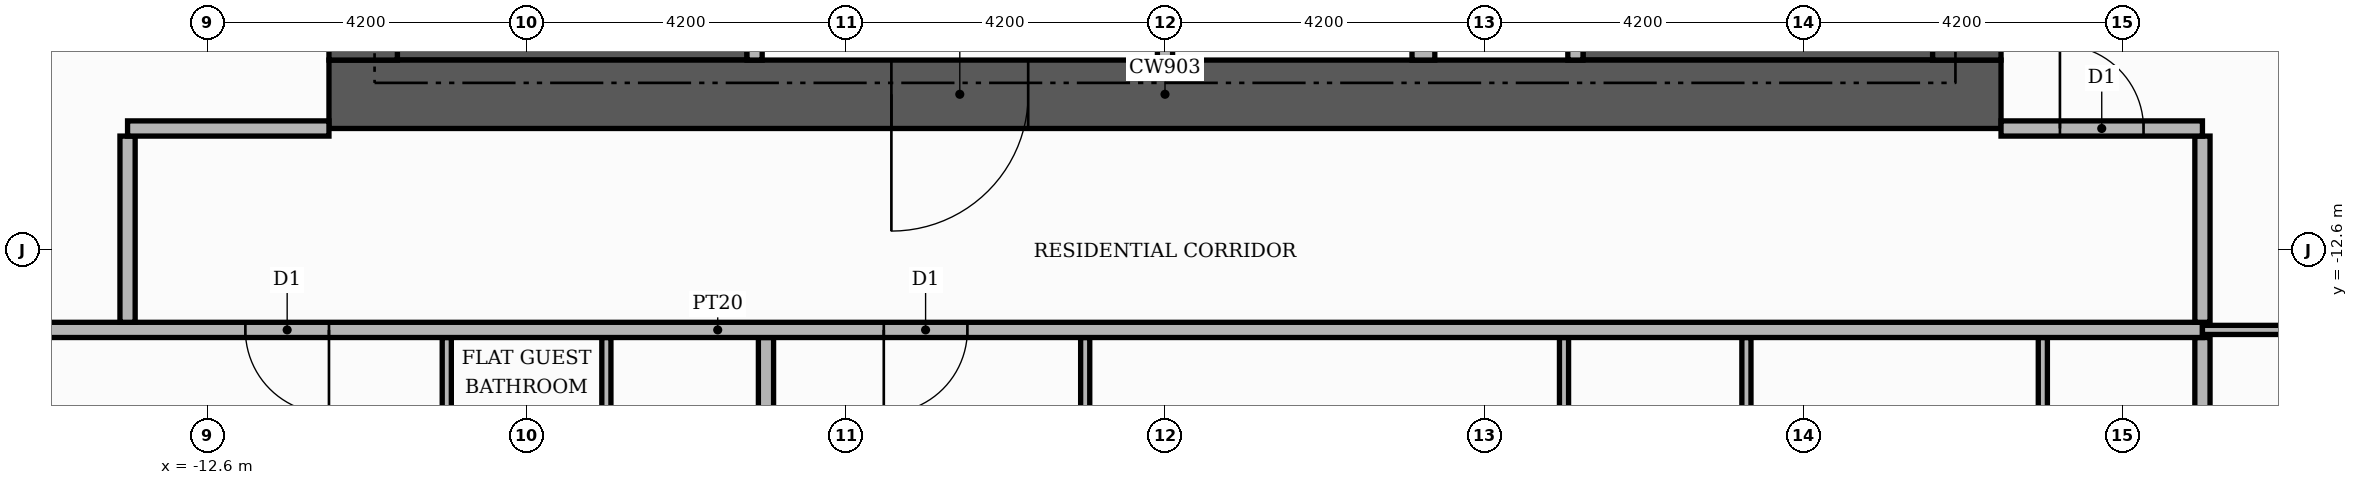
"""IFC4 building model, lengths in metres.
Left out: names, types, materials, properties, quantities, classifications, styles, units other than length and angle.
Written with IfcOpenShell. Run it as: python <this file> out.ifc"""

import sys

from ifc_helpers import new_model, si_unit, direction, frame, frame_2d, origin, place, context, subcontext, project, spatial, rectangle, extrude, element, fill, save


model = new_model("IFC4")
c1 = context("Model", 3, precision=1e-05, world=origin(), true_north=direction((0.0, 1.0)))
c2 = subcontext(c1, "Body", "Model", "MODEL_VIEW")
j1 = project(units=[si_unit("LENGTHUNIT", "METRE"), si_unit("PLANEANGLEUNIT", "RADIAN")], contexts=[c1])
p1 = place(None, origin())
s1 = spatial("IfcSite", under=j1, at=p1, CompositionType="ELEMENT")
p2 = place(p1, origin())
s2 = spatial("IfcBuilding", under=s1, at=p2, CompositionType="ELEMENT")
p3 = place(p2, frame((0.0, 0.0, 165.0)))
s3 = spatial("IfcBuildingStorey", under=s2, at=p3, CompositionType="ELEMENT", Elevation=165.0)
for number, where, z_axis, x_axis in (
    (1, (-10.1, -9.15, 0.0), (0.0, 0.0, 1.0), (1.0, 0.0, 0.0)),
    (2, (5.5, -9.15, 0.0), (0.0, 0.0, 1.0), (1.0, 0.0, 0.0)),
):
    element("IfcWall", number, at=place(p3, frame(where, z_axis=z_axis, x_axis=x_axis)), inside=s3, PredefinedType="SHEAR", context=c2, shape_type="SweptSolid", body=[
        extrude(rectangle(XDim=4.6, YDim=1.9, at=frame_2d((2.3, 0.0))), origin(), (0.0, 0.0, 1.0), 3.48),
    ])
p4 = place(p3, frame((-11.0, -10.55, 0.0), z_axis=(0.0, 0.0, 1.0), x_axis=(1.0, 0.0, 0.0)))
e3 = element("IfcWall", 3, at=p4, inside=s3, PredefinedType="SHEAR", context=c2, shape_type="SweptSolid", body=[
    extrude(rectangle(XDim=22.0, YDim=0.9, at=frame_2d((11.0, 0.0))), origin(), (0.0, 0.0, 1.0), 3.48),
])
p5 = place(p4, frame((7.4, 0.0, 0.0)))
e4 = element("IfcOpeningElement", 4, at=p5, cuts=e3, PredefinedType="OPENING", context=c2, shape_type="SweptSolid", body=[
    extrude(rectangle(XDim=1.8, YDim=2.2, at=frame_2d((0.9, 1.1))), frame((0.0, 0.46, 0.0), z_axis=(0.0, -1.0, 0.0), x_axis=(1.0, 0.0, 0.0)), (0.0, 0.0, 1.0), 0.92),
])
for number, where, z_axis, x_axis in (
    (5, (-10.55, -10.1, 0.0), (0.0, 0.0, 1.0), (0.0, 1.0, 0.0)),
    (6, (10.55, -10.1, 0.0), (0.0, 0.0, 1.0), (0.0, 1.0, 0.0)),
):
    element("IfcWall", number, at=place(p3, frame(where, z_axis=z_axis, x_axis=x_axis)), inside=s3, PredefinedType="SHEAR", context=c2, shape_type="SweptSolid", body=[
        extrude(rectangle(XDim=20.2, YDim=0.9, at=frame_2d((10.1, 0.0))), origin(), (0.0, 0.0, 1.0), 3.48),
    ])
p6 = place(p3, frame((-5.4, -10.1, 0.0), z_axis=(0.0, 0.0, 1.0), x_axis=(0.0, 1.0, 0.0)))
e7 = element("IfcWall", 7, at=p6, inside=s3, PredefinedType="PARTITIONING", context=c2, shape_type="SweptSolid", body=[
    extrude(rectangle(XDim=4.6, YDim=0.2, at=frame_2d((2.3, 0.0))), origin(), (0.0, 0.0, 1.0), 3.48),
])
p7 = place(p6, frame((2.9, 0.0, 0.0)))
e8 = element("IfcOpeningElement", 8, at=p7, cuts=e7, PredefinedType="OPENING", context=c2, shape_type="SweptSolid", body=[
    extrude(rectangle(XDim=1.0, YDim=2.1, at=frame_2d((0.5, 1.05))), frame((0.0, 0.11, 0.0), z_axis=(0.0, -1.0, 0.0), x_axis=(1.0, 0.0, 0.0)), (0.0, 0.0, 1.0), 0.22),
])
p8 = place(p3, frame((0.0, -10.1, 0.0), z_axis=(0.0, 0.0, 1.0), x_axis=(0.0, 1.0, 0.0)))
e9 = element("IfcWall", 9, at=p8, inside=s3, PredefinedType="PARTITIONING", context=c2, shape_type="SweptSolid", body=[
    extrude(rectangle(XDim=2.2, YDim=0.2, at=frame_2d((1.1, 0.0))), origin(), (0.0, 0.0, 1.0), 3.48),
])
p9 = place(p3, frame((3.4, -10.1, 0.0), z_axis=(0.0, 0.0, 1.0), x_axis=(0.0, 1.0, 0.0)))
e10 = element("IfcWall", 10, at=p9, inside=s3, PredefinedType="PARTITIONING", context=c2, shape_type="SweptSolid", body=[
    extrude(rectangle(XDim=2.2, YDim=0.3, at=frame_2d((1.1, 0.0))), origin(), (0.0, 0.0, 1.0), 3.48),
])
p10 = place(p3, frame((5.4, -10.1, 0.0), z_axis=(0.0, 0.0, 1.0), x_axis=(0.0, 1.0, 0.0)))
e11 = element("IfcWall", 11, at=p10, inside=s3, PredefinedType="PARTITIONING", context=c2, shape_type="SweptSolid", body=[
    extrude(rectangle(XDim=4.6, YDim=0.2, at=frame_2d((2.3, 0.0))), origin(), (0.0, 0.0, 1.0), 3.48),
])
p11 = place(p10, frame((2.9, 0.0, 0.0)))
e12 = element("IfcOpeningElement", 12, at=p11, cuts=e11, PredefinedType="OPENING", context=c2, shape_type="SweptSolid", body=[
    extrude(rectangle(XDim=1.0, YDim=2.1, at=frame_2d((0.5, 1.05))), frame((0.0, 0.11, 0.0), z_axis=(0.0, -1.0, 0.0), x_axis=(1.0, 0.0, 0.0)), (0.0, 0.0, 1.0), 0.22),
])
for number, where, z_axis, x_axis in (
    (13, (-5.25, -25.42, 0.0), (0.0, 0.0, 1.0), (0.0, 1.0, 0.0)),
    (14, (13.65, -25.42, 0.0), (0.0, 0.0, 1.0), (0.0, 1.0, 0.0)),
):
    element("IfcWall", number, at=place(p3, frame(where, z_axis=z_axis, x_axis=x_axis)), inside=s3, PredefinedType="PARTITIONING", context=c2, shape_type="SweptSolid", body=[
        extrude(rectangle(XDim=11.67, YDim=0.2, at=frame_2d((5.835, 0.0))), origin(), (0.0, 0.0, 1.0), 3.48),
    ])
for number, where, z_axis, x_axis in (
    (15, (-1.05, -18.86, 0.0), (0.0, 0.0, 1.0), (0.0, 1.0, 0.0)),
    (16, (5.25, -18.86, 0.0), (0.0, 0.0, 1.0), (0.0, 1.0, 0.0)),
    (17, (7.65, -18.86, 0.0), (0.0, 0.0, 1.0), (0.0, 1.0, 0.0)),
    (18, (11.55, -18.86, 0.0), (0.0, 0.0, 1.0), (0.0, 1.0, 0.0)),
):
    element("IfcWall", number, at=place(p3, frame(where, z_axis=z_axis, x_axis=x_axis)), inside=s3, PredefinedType="PARTITIONING", context=c2, shape_type="SweptSolid", body=[
        extrude(rectangle(XDim=5.11, YDim=0.12, at=frame_2d((2.555, 0.0))), origin(), (0.0, 0.0, 1.0), 3.48),
    ])
p12 = place(p3, frame((-9.45, -18.56, 0.0), z_axis=(0.0, 0.0, 1.0), x_axis=(0.0, 1.0, 0.0)))
e19 = element("IfcWall", 19, at=p12, inside=s3, PredefinedType="PARTITIONING", context=c2, shape_type="SweptSolid", body=[
    extrude(rectangle(XDim=4.81, YDim=0.12, at=frame_2d((2.405, 0.0))), origin(), (0.0, 0.0, 1.0), 3.48),
])
p13 = place(p12, frame((1.975, 0.0, 0.0)))
e20 = element("IfcOpeningElement", 20, at=p13, cuts=e19, PredefinedType="OPENING", context=c2, shape_type="SweptSolid", body=[
    extrude(rectangle(XDim=0.9, YDim=2.1, at=frame_2d((0.45, 1.05))), frame((0.0, 0.07, 0.0), z_axis=(0.0, -1.0, 0.0), x_axis=(1.0, 0.0, 0.0)), (0.0, 0.0, 1.0), 0.14),
])
p14 = place(p3, frame((-7.35, -18.56, 0.0), z_axis=(0.0, 0.0, 1.0), x_axis=(0.0, 1.0, 0.0)))
e21 = element("IfcWall", 21, at=p14, inside=s3, PredefinedType="PARTITIONING", context=c2, shape_type="SweptSolid", body=[
    extrude(rectangle(XDim=4.81, YDim=0.12, at=frame_2d((2.405, 0.0))), origin(), (0.0, 0.0, 1.0), 3.48),
])
p15 = place(p3, frame((-25.42, -13.65, 0.0), z_axis=(0.0, 0.0, 1.0), x_axis=(1.0, 0.0, 0.0)))
e22 = element("IfcWall", 22, at=p15, inside=s3, PredefinedType="PARTITIONING", context=c2, shape_type="SweptSolid", body=[
    extrude(rectangle(XDim=39.07, YDim=0.2, at=frame_2d((19.535, 0.0))), origin(), (0.0, 0.0, 1.0), 3.48),
])
p16 = place(p15, frame((13.32, 0.0, 0.0)))
e23 = element("IfcOpeningElement", 23, at=p16, cuts=e22, PredefinedType="OPENING", context=c2, shape_type="SweptSolid", body=[
    extrude(rectangle(XDim=1.1, YDim=2.4, at=frame_2d((0.55, 1.2))), frame((0.0, 0.11, 0.0), z_axis=(0.0, -1.0, 0.0), x_axis=(1.0, 0.0, 0.0)), (0.0, 0.0, 1.0), 0.22),
])
p17 = place(p15, frame((21.72, 0.0, 0.0)))
e24 = element("IfcOpeningElement", 24, at=p17, cuts=e22, PredefinedType="OPENING", context=c2, shape_type="SweptSolid", body=[
    extrude(rectangle(XDim=1.1, YDim=2.4, at=frame_2d((0.55, 1.2))), frame((0.0, 0.11, 0.0), z_axis=(0.0, -1.0, 0.0), x_axis=(1.0, 0.0, 0.0)), (0.0, 0.0, 1.0), 0.22),
])
p18 = place(p3, frame((13.65, -13.65, 0.0), z_axis=(0.0, 0.0, 1.0), x_axis=(1.0, 0.0, 0.0)))
e25 = element("IfcWall", 25, at=p18, inside=s3, PredefinedType="PARTITIONING", context=c2, shape_type="SweptSolid", body=[
    extrude(rectangle(XDim=7.07, YDim=0.12, at=frame_2d((3.535, 0.0))), origin(), (0.0, 0.0, 1.0), 3.48),
])
p19 = place(p18, frame((3.085, 0.0, 0.0)))
e26 = element("IfcOpeningElement", 26, at=p19, cuts=e25, PredefinedType="OPENING", context=c2, shape_type="SweptSolid", body=[
    extrude(rectangle(XDim=0.9, YDim=2.1, at=frame_2d((0.45, 1.05))), frame((0.0, 0.07, 0.0), z_axis=(0.0, -1.0, 0.0), x_axis=(1.0, 0.0, 0.0)), (0.0, 0.0, 1.0), 0.14),
])
for number, where, z_axis, x_axis in (
    (27, (-13.65, -13.55, 0.0), (0.0, 0.0, 1.0), (0.0, 1.0, 0.0)),
    (28, (13.65, -13.55, 0.0), (0.0, 0.0, 1.0), (0.0, 1.0, 0.0)),
):
    element("IfcWall", number, at=place(p3, frame(where, z_axis=z_axis, x_axis=x_axis)), inside=s3, PredefinedType="PARTITIONING", context=c2, shape_type="SweptSolid", body=[
        extrude(rectangle(XDim=2.45, YDim=0.2, at=frame_2d((1.225, 0.0))), origin(), (0.0, 0.0, 1.0), 3.48),
    ])
p20 = place(p3, frame((-13.65, -11.0, 0.0), z_axis=(0.0, 0.0, 1.0), x_axis=(1.0, 0.0, 0.0)))
e29 = element("IfcWall", 29, at=p20, inside=s3, PredefinedType="PARTITIONING", context=c2, shape_type="SweptSolid", body=[
    extrude(rectangle(XDim=2.65, YDim=0.2, at=frame_2d((1.325, 0.0))), origin(), (0.0, 0.0, 1.0), 3.48),
])
p21 = place(p3, frame((11.0, -11.0, 0.0), z_axis=(0.0, 0.0, 1.0), x_axis=(1.0, 0.0, 0.0)))
e30 = element("IfcWall", 30, at=p21, inside=s3, PredefinedType="PARTITIONING", context=c2, shape_type="SweptSolid", body=[
    extrude(rectangle(XDim=2.65, YDim=0.2, at=frame_2d((1.325, 0.0))), origin(), (0.0, 0.0, 1.0), 3.48),
])
p22 = place(p21, frame((0.775, 0.0, 0.0)))
e31 = element("IfcOpeningElement", 31, at=p22, cuts=e30, PredefinedType="OPENING", context=c2, shape_type="SweptSolid", body=[
    extrude(rectangle(XDim=1.1, YDim=2.4, at=frame_2d((0.55, 1.2))), frame((0.0, 0.11, 0.0), z_axis=(0.0, -1.0, 0.0), x_axis=(1.0, 0.0, 0.0)), (0.0, 0.0, 1.0), 0.22),
])
p23 = place(p5, frame((1.8, 0.0, 0.0), z_axis=(0.0, 0.0, 1.0), x_axis=(-1.0, 0.0, 0.0)))
e32 = element("IfcDoor", 32, at=p23, inside=s3, OperationType="DOUBLE_DOOR_SINGLE_SWING", PredefinedType="DOOR", context=c2, shape_type="SweptSolid", body=[
    extrude(rectangle(XDim=1.8, YDim=2.2, at=frame_2d((0.9, 1.1))), frame((0.0, 0.025, 0.0), z_axis=(0.0, -1.0, 0.0), x_axis=(1.0, 0.0, 0.0)), (0.0, 0.0, 1.0), 0.05),
])
fill(e4, e32)
p24 = place(p16, frame((1.1, 0.0, 0.0), z_axis=(0.0, 0.0, 1.0), x_axis=(-1.0, 0.0, 0.0)))
e33 = element("IfcDoor", 33, at=p24, inside=s3, OperationType="SINGLE_SWING_RIGHT", PredefinedType="DOOR", context=c2, shape_type="SweptSolid", body=[
    extrude(rectangle(XDim=1.1, YDim=2.4, at=frame_2d((0.55, 1.2))), frame((0.0, 0.025, 0.0), z_axis=(0.0, -1.0, 0.0), x_axis=(1.0, 0.0, 0.0)), (0.0, 0.0, 1.0), 0.05),
])
fill(e23, e33)
p25 = place(p17, frame((1.1, 0.0, 0.0), z_axis=(0.0, 0.0, 1.0), x_axis=(-1.0, 0.0, 0.0)))
e34 = element("IfcDoor", 34, at=p25, inside=s3, OperationType="SINGLE_SWING_LEFT", PredefinedType="DOOR", context=c2, shape_type="SweptSolid", body=[
    extrude(rectangle(XDim=1.1, YDim=2.4, at=frame_2d((0.55, 1.2))), frame((0.0, 0.025, 0.0), z_axis=(0.0, -1.0, 0.0), x_axis=(1.0, 0.0, 0.0)), (0.0, 0.0, 1.0), 0.05),
])
fill(e24, e34)
p26 = place(p22, origin())
e35 = element("IfcDoor", 35, at=p26, inside=s3, OperationType="SINGLE_SWING_LEFT", PredefinedType="DOOR", context=c2, shape_type="SweptSolid", body=[
    extrude(rectangle(XDim=1.1, YDim=2.4, at=frame_2d((0.55, 1.2))), frame((0.0, 0.025, 0.0), z_axis=(0.0, -1.0, 0.0), x_axis=(1.0, 0.0, 0.0)), (0.0, 0.0, 1.0), 0.05),
])
fill(e31, e35)
save(model, sys.argv[1])
